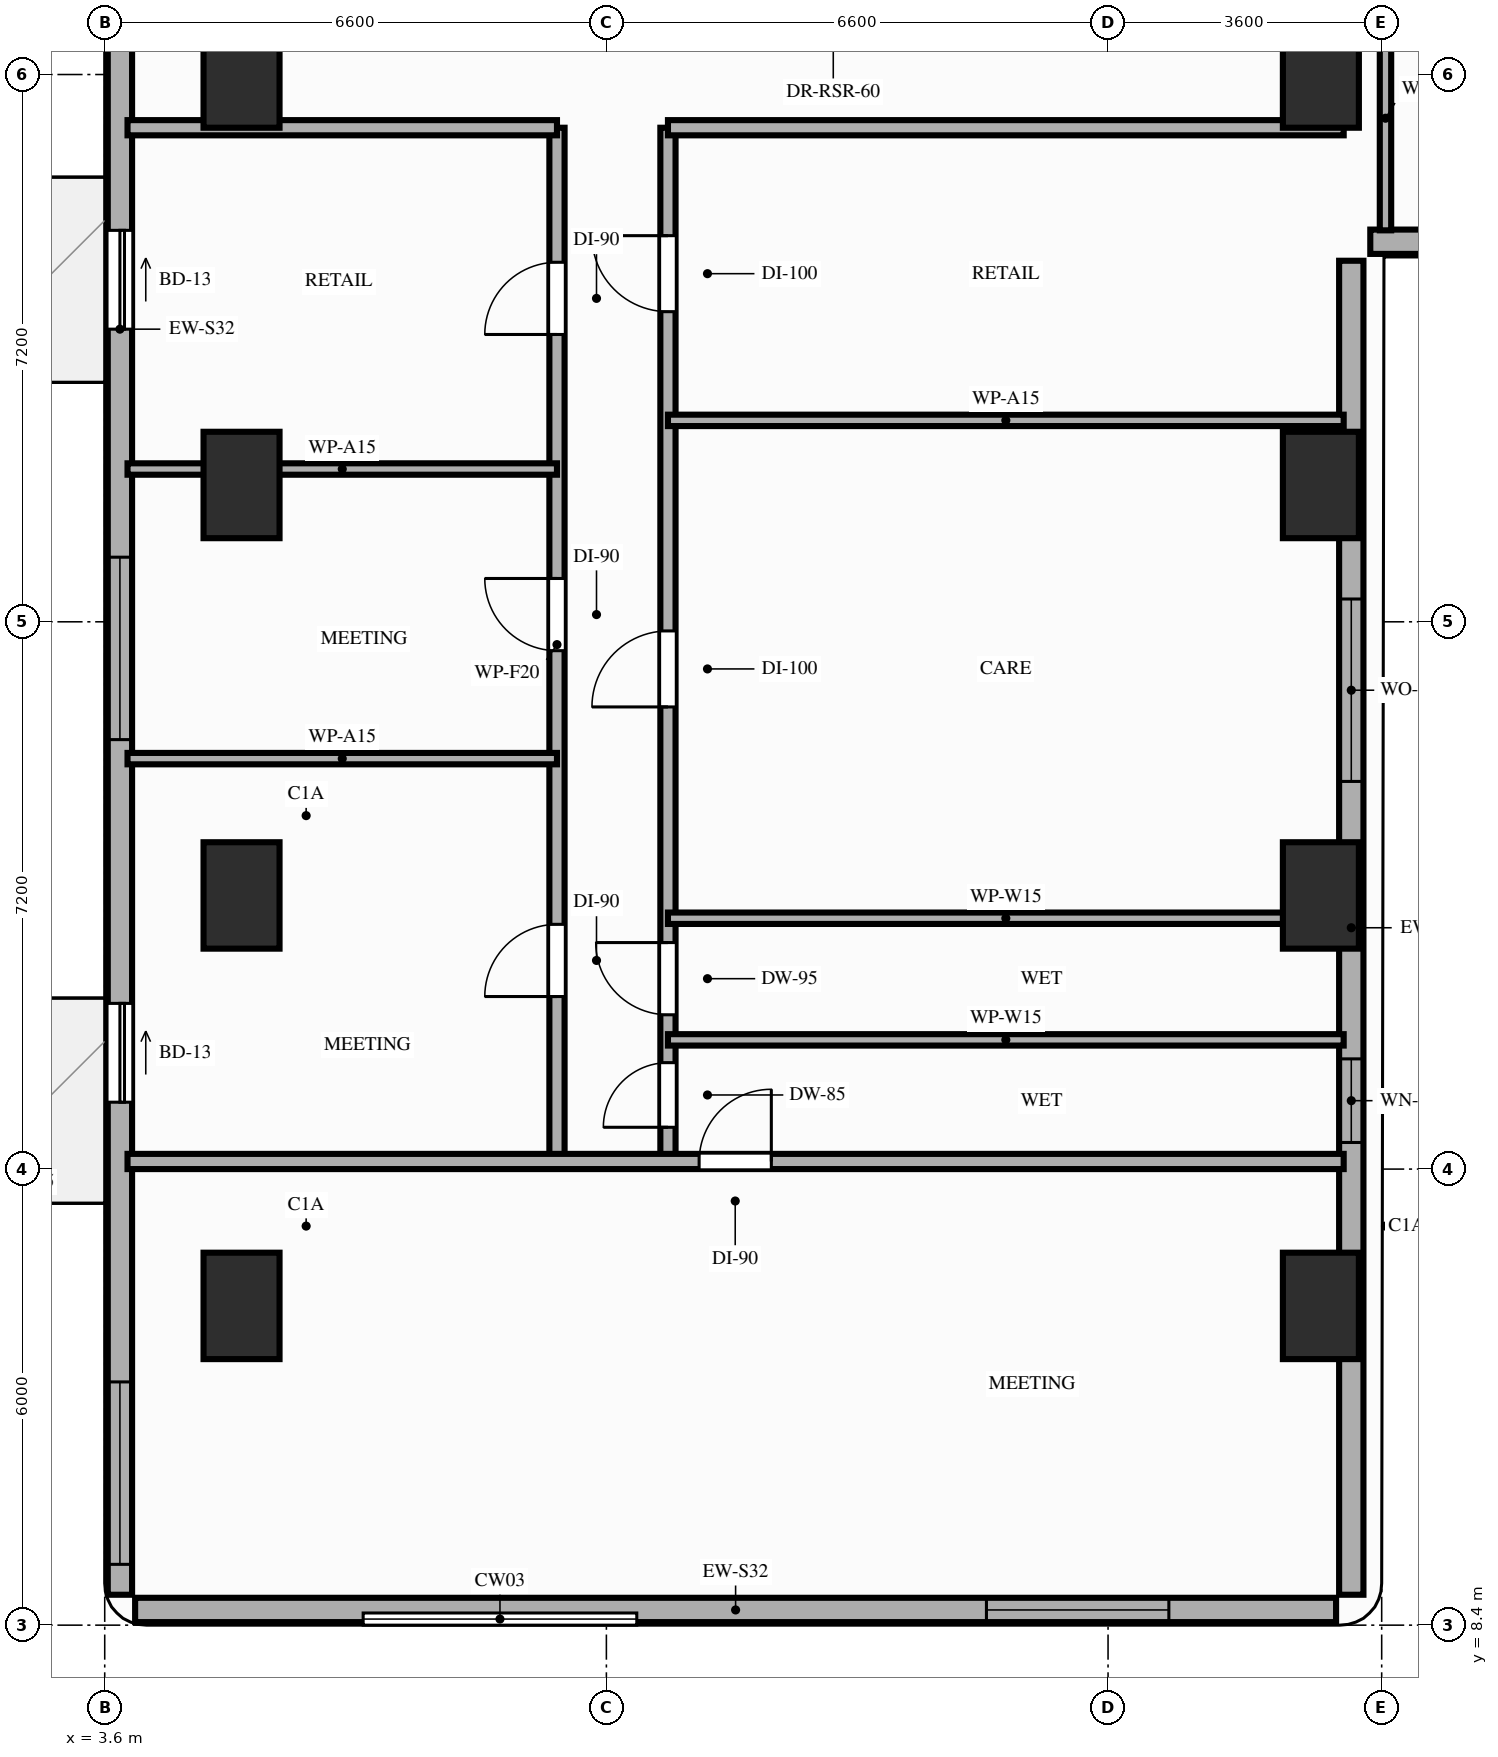
"""IFC4 building model, lengths in metres.
Left out: names, types, materials, properties, quantities, classifications, styles, units other than length and angle.
Written with IfcOpenShell. Run it as: python <this file> out.ifc"""

import sys

from ifc_helpers import new_model, si_unit, direction, frame, frame_2d, origin, origin_2d, place, context, subcontext, project, spatial, rectangle, extrude, element, fill, save


model = new_model("IFC4")
c1 = context("Model", 3, precision=1e-05, world=origin(), true_north=direction((0.0, 1.0)))
c2 = subcontext(c1, "Body", "Model", "MODEL_VIEW")
j1 = project(units=[si_unit("LENGTHUNIT", "METRE"), si_unit("PLANEANGLEUNIT", "RADIAN")], contexts=[c1])
p1 = place(None, origin())
s1 = spatial("IfcSite", under=j1, at=p1, CompositionType="ELEMENT")
p2 = place(p1, origin())
s2 = spatial("IfcBuilding", under=s1, at=p2, CompositionType="ELEMENT")
p3 = place(p2, frame((0.0, 0.0, 50.0)))
s3 = spatial("IfcBuildingStorey", under=s2, at=p3, CompositionType="ELEMENT", Elevation=50.0)
for number, where, z_axis, x_axis in (
    (1, (5.4, 12.6, 0.0), (0.0, 0.0, 1.0), (1.0, 0.0, 0.0)),
    (2, (19.6, 12.6, 0.0), (0.0, 0.0, 1.0), (1.0, 0.0, 0.0)),
    (3, (5.4, 18.0, 0.0), (0.0, 0.0, 1.0), (1.0, 0.0, 0.0)),
    (4, (19.6, 18.0, 0.0), (0.0, 0.0, 1.0), (1.0, 0.0, 0.0)),
    (5, (5.4, 23.4, 0.0), (0.0, 0.0, 1.0), (1.0, 0.0, 0.0)),
    (6, (19.6, 23.4, 0.0), (0.0, 0.0, 1.0), (1.0, 0.0, 0.0)),
    (7, (5.4, 28.8, 0.0), (0.0, 0.0, 1.0), (1.0, 0.0, 0.0)),
    (8, (19.6, 28.8, 0.0), (0.0, 0.0, 1.0), (1.0, 0.0, 0.0)),
):
    element("IfcColumn", number, at=place(p3, frame(where, z_axis=z_axis, x_axis=x_axis)), inside=s3, PredefinedType="COLUMN", context=c2, shape_type="SweptSolid", body=[
        extrude(rectangle(XDim=1.0, YDim=1.4, at=origin_2d()), origin(), (0.0, 0.0, 1.0), 3.2),
    ])
p4 = place(p3, frame((4.0, 8.6, 0.0), z_axis=(0.0, 0.0, 1.0), x_axis=(1.0, 0.0, 0.0)))
e9 = element("IfcWall", 9, at=p4, inside=s3, PredefinedType="STANDARD", context=c2, shape_type="SweptSolid", body=[
    extrude(rectangle(XDim=15.8, YDim=0.32, at=frame_2d((7.9, 0.0))), origin(), (0.0, 0.0, 1.0), 3.02),
])
p5 = place(p4, frame((11.2, 0.0, 0.85)))
e10 = element("IfcOpeningElement", 10, at=p5, cuts=e9, PredefinedType="OPENING", context=c2, shape_type="SweptSolid", body=[
    extrude(rectangle(XDim=2.4, YDim=1.8, at=frame_2d((1.2, 0.9))), frame((0.0, 0.17, 0.0), z_axis=(0.0, -1.0, 0.0), x_axis=(1.0, 0.0, 0.0)), (0.0, 0.0, 1.0), 0.34),
])
p6 = place(p3, frame((3.8, 42.1, 0.0), z_axis=(0.0, 0.0, 1.0), x_axis=(0.0, -1.0, 0.0)))
e11 = element("IfcWall", 11, at=p6, inside=s3, PredefinedType="STANDARD", context=c2, shape_type="SweptSolid", body=[
    extrude(rectangle(XDim=33.3, YDim=0.32, at=frame_2d((16.65, 0.0))), origin(), (0.0, 0.0, 1.0), 2.7),
])
p7 = place(p6, frame((25.52, 0.0, 0.0)))
e12 = element("IfcOpeningElement", 12, at=p7, cuts=e11, PredefinedType="OPENING", context=c2, shape_type="SweptSolid", body=[
    extrude(rectangle(XDim=1.3, YDim=2.08, at=frame_2d((0.65, 1.04))), frame((0.0, 0.17, 0.0), z_axis=(0.0, -1.0, 0.0), x_axis=(1.0, 0.0, 0.0)), (0.0, 0.0, 1.0), 0.34),
])
p8 = place(p6, frame((15.35, 0.0, 0.0)))
e13 = element("IfcOpeningElement", 13, at=p8, cuts=e11, PredefinedType="OPENING", context=c2, shape_type="SweptSolid", body=[
    extrude(rectangle(XDim=1.3, YDim=2.08, at=frame_2d((0.65, 1.04))), frame((0.0, 0.17, 0.0), z_axis=(0.0, -1.0, 0.0), x_axis=(1.0, 0.0, 0.0)), (0.0, 0.0, 1.0), 0.34),
])
p9 = place(p6, frame((30.5, 0.0, 0.85)))
e14 = element("IfcOpeningElement", 14, at=p9, cuts=e11, PredefinedType="OPENING", context=c2, shape_type="SweptSolid", body=[
    extrude(rectangle(XDim=2.4, YDim=1.6, at=frame_2d((1.2, 0.8))), frame((0.0, 0.17, 0.0), z_axis=(0.0, -1.0, 0.0), x_axis=(1.0, 0.0, 0.0)), (0.0, 0.0, 1.0), 0.34),
])
p10 = place(p6, frame((19.65, 0.0, 0.85)))
e15 = element("IfcOpeningElement", 15, at=p10, cuts=e11, PredefinedType="OPENING", context=c2, shape_type="SweptSolid", body=[
    extrude(rectangle(XDim=2.4, YDim=1.6, at=frame_2d((1.2, 0.8))), frame((0.0, 0.17, 0.0), z_axis=(0.0, -1.0, 0.0), x_axis=(1.0, 0.0, 0.0)), (0.0, 0.0, 1.0), 0.34),
])
p11 = place(p6, frame((9.6, 0.0, 0.85)))
e16 = element("IfcOpeningElement", 16, at=p11, cuts=e11, PredefinedType="OPENING", context=c2, shape_type="SweptSolid", body=[
    extrude(rectangle(XDim=2.4, YDim=1.6, at=frame_2d((1.2, 0.8))), frame((0.0, 0.17, 0.0), z_axis=(0.0, -1.0, 0.0), x_axis=(1.0, 0.0, 0.0)), (0.0, 0.0, 1.0), 0.34),
])
p12 = place(p6, frame((3.5, 0.0, 0.85)))
e17 = element("IfcOpeningElement", 17, at=p12, cuts=e11, PredefinedType="OPENING", context=c2, shape_type="SweptSolid", body=[
    extrude(rectangle(XDim=2.4, YDim=1.6, at=frame_2d((1.2, 0.8))), frame((0.0, 0.17, 0.0), z_axis=(0.0, -1.0, 0.0), x_axis=(1.0, 0.0, 0.0)), (0.0, 0.0, 1.0), 0.34),
])
p13 = place(p3, frame((20.0, 8.8, 0.0), z_axis=(0.0, 0.0, 1.0), x_axis=(0.0, 1.0, 0.0)))
e18 = element("IfcWall", 18, at=p13, inside=s3, PredefinedType="STANDARD", context=c2, shape_type="SweptSolid", body=[
    extrude(rectangle(XDim=17.55, YDim=0.32, at=frame_2d((8.775, 0.0))), origin(), (0.0, 0.0, 1.0), 2.41),
])
p14 = place(p13, frame((10.7, 0.0, 0.85)))
e19 = element("IfcOpeningElement", 19, at=p14, cuts=e18, PredefinedType="OPENING", context=c2, shape_type="SweptSolid", body=[
    extrude(rectangle(XDim=2.4, YDim=1.31, at=frame_2d((1.2, 0.655))), frame((0.0, 0.17, 0.0), z_axis=(0.0, -1.0, 0.0), x_axis=(1.0, 0.0, 0.0)), (0.0, 0.0, 1.0), 0.34),
])
p15 = place(p13, frame((5.95, 0.0, 0.85)))
e20 = element("IfcOpeningElement", 20, at=p15, cuts=e18, PredefinedType="OPENING", context=c2, shape_type="SweptSolid", body=[
    extrude(rectangle(XDim=1.1, YDim=1.31, at=frame_2d((0.55, 0.655))), frame((0.0, 0.17, 0.0), z_axis=(0.0, -1.0, 0.0), x_axis=(1.0, 0.0, 0.0)), (0.0, 0.0, 1.0), 0.34),
])
p16 = place(p3, frame((20.25, 26.6, 0.0), z_axis=(0.0, 0.0, 1.0), x_axis=(1.0, 0.0, 0.0)))
e21 = element("IfcWall", 21, at=p16, inside=s3, PredefinedType="STANDARD", context=c2, shape_type="SweptSolid", body=[
    extrude(rectangle(XDim=26.15, YDim=0.32, at=frame_2d((13.075, 0.0))), origin(), (0.0, 0.0, 1.0), 3.02),
])
p17 = place(p16, frame((1.95, 0.0, 0.85)))
e22 = element("IfcOpeningElement", 22, at=p17, cuts=e21, PredefinedType="OPENING", context=c2, shape_type="SweptSolid", body=[
    extrude(rectangle(XDim=2.4, YDim=1.8, at=frame_2d((1.2, 0.9))), frame((0.0, 0.17, 0.0), z_axis=(0.0, -1.0, 0.0), x_axis=(1.0, 0.0, 0.0)), (0.0, 0.0, 1.0), 0.34),
])
p18 = place(p16, frame((7.45, 0.0, 0.85)))
e23 = element("IfcOpeningElement", 23, at=p18, cuts=e21, PredefinedType="OPENING", context=c2, shape_type="SweptSolid", body=[
    extrude(rectangle(XDim=2.4, YDim=1.8, at=frame_2d((1.2, 0.9))), frame((0.0, 0.17, 0.0), z_axis=(0.0, -1.0, 0.0), x_axis=(1.0, 0.0, 0.0)), (0.0, 0.0, 1.0), 0.34),
])
p19 = place(p16, frame((21.95, 0.0, 0.85)))
e24 = element("IfcOpeningElement", 24, at=p19, cuts=e21, PredefinedType="OPENING", context=c2, shape_type="SweptSolid", body=[
    extrude(rectangle(XDim=2.4, YDim=1.8, at=frame_2d((1.2, 0.9))), frame((0.0, 0.17, 0.0), z_axis=(0.0, -1.0, 0.0), x_axis=(1.0, 0.0, 0.0)), (0.0, 0.0, 1.0), 0.34),
])
p20 = place(p3, frame((9.55, 14.5, 0.0), z_axis=(0.0, 0.0, 1.0), x_axis=(0.0, 1.0, 0.0)))
e25 = element("IfcWall", 25, at=p20, inside=s3, PredefinedType="PARTITIONING", context=c2, shape_type="SweptSolid", body=[
    extrude(rectangle(XDim=13.6, YDim=0.2, at=frame_2d((6.8, 0.0))), origin(), (0.0, 0.0, 1.0), 2.41),
])
p21 = place(p20, frame((2.17, 0.0, 0.0)))
e26 = element("IfcOpeningElement", 26, at=p21, cuts=e25, PredefinedType="OPENING", context=c2, shape_type="SweptSolid", body=[
    extrude(rectangle(XDim=0.95, YDim=2.15, at=frame_2d((0.475, 1.075))), frame((0.0, 0.11, 0.0), z_axis=(0.0, -1.0, 0.0), x_axis=(1.0, 0.0, 0.0)), (0.0, 0.0, 1.0), 0.22),
])
p22 = place(p20, frame((6.72, 0.0, 0.0)))
e27 = element("IfcOpeningElement", 27, at=p22, cuts=e25, PredefinedType="OPENING", context=c2, shape_type="SweptSolid", body=[
    extrude(rectangle(XDim=0.95, YDim=2.15, at=frame_2d((0.475, 1.075))), frame((0.0, 0.11, 0.0), z_axis=(0.0, -1.0, 0.0), x_axis=(1.0, 0.0, 0.0)), (0.0, 0.0, 1.0), 0.22),
])
p23 = place(p20, frame((10.88, 0.0, 0.0)))
e28 = element("IfcOpeningElement", 28, at=p23, cuts=e25, PredefinedType="OPENING", context=c2, shape_type="SweptSolid", body=[
    extrude(rectangle(XDim=0.95, YDim=2.15, at=frame_2d((0.475, 1.075))), frame((0.0, 0.11, 0.0), z_axis=(0.0, -1.0, 0.0), x_axis=(1.0, 0.0, 0.0)), (0.0, 0.0, 1.0), 0.22),
])
p24 = place(p3, frame((11.01, 14.5, 0.0), z_axis=(0.0, 0.0, 1.0), x_axis=(0.0, 1.0, 0.0)))
e29 = element("IfcWall", 29, at=p24, inside=s3, PredefinedType="PARTITIONING", context=c2, shape_type="SweptSolid", body=[
    extrude(rectangle(XDim=13.6, YDim=0.2, at=frame_2d((6.8, 0.0))), origin(), (0.0, 0.0, 1.0), 2.41),
])
p25 = place(p24, frame((0.45, 0.0, 0.0)))
e30 = element("IfcOpeningElement", 30, at=p25, cuts=e29, PredefinedType="OPENING", context=c2, shape_type="SweptSolid", body=[
    extrude(rectangle(XDim=0.85, YDim=2.1, at=frame_2d((0.425, 1.05))), frame((0.0, 0.11, 0.0), z_axis=(0.0, -1.0, 0.0), x_axis=(1.0, 0.0, 0.0)), (0.0, 0.0, 1.0), 0.22),
])
p26 = place(p24, frame((1.93, 0.0, 0.0)))
e31 = element("IfcOpeningElement", 31, at=p26, cuts=e29, PredefinedType="OPENING", context=c2, shape_type="SweptSolid", body=[
    extrude(rectangle(XDim=0.95, YDim=2.1, at=frame_2d((0.475, 1.05))), frame((0.0, 0.11, 0.0), z_axis=(0.0, -1.0, 0.0), x_axis=(1.0, 0.0, 0.0)), (0.0, 0.0, 1.0), 0.22),
])
p27 = place(p24, frame((5.98, 0.0, 0.0)))
e32 = element("IfcOpeningElement", 32, at=p27, cuts=e29, PredefinedType="OPENING", context=c2, shape_type="SweptSolid", body=[
    extrude(rectangle(XDim=1.0, YDim=2.15, at=frame_2d((0.5, 1.075))), frame((0.0, 0.11, 0.0), z_axis=(0.0, -1.0, 0.0), x_axis=(1.0, 0.0, 0.0)), (0.0, 0.0, 1.0), 0.22),
])
p28 = place(p24, frame((11.18, 0.0, 0.0)))
e33 = element("IfcOpeningElement", 33, at=p28, cuts=e29, PredefinedType="OPENING", context=c2, shape_type="SweptSolid", body=[
    extrude(rectangle(XDim=1.0, YDim=2.15, at=frame_2d((0.5, 1.075))), frame((0.0, 0.11, 0.0), z_axis=(0.0, -1.0, 0.0), x_axis=(1.0, 0.0, 0.0)), (0.0, 0.0, 1.0), 0.22),
])
p29 = place(p3, frame((3.9, 14.5, 0.0), z_axis=(0.0, 0.0, 1.0), x_axis=(1.0, 0.0, 0.0)))
e34 = element("IfcWall", 34, at=p29, inside=s3, PredefinedType="PARTITIONING", context=c2, shape_type="SweptSolid", body=[
    extrude(rectangle(XDim=16.0, YDim=0.2, at=frame_2d((8.0, 0.0))), origin(), (0.0, 0.0, 1.0), 2.41),
])
p30 = place(p29, frame((7.52, 0.0, 0.0)))
e35 = element("IfcOpeningElement", 35, at=p30, cuts=e34, PredefinedType="OPENING", context=c2, shape_type="SweptSolid", body=[
    extrude(rectangle(XDim=0.95, YDim=2.15, at=frame_2d((0.475, 1.075))), frame((0.0, 0.11, 0.0), z_axis=(0.0, -1.0, 0.0), x_axis=(1.0, 0.0, 0.0)), (0.0, 0.0, 1.0), 0.22),
])
p31 = place(p3, frame((3.9, 28.1, 0.0), z_axis=(0.0, 0.0, 1.0), x_axis=(1.0, 0.0, 0.0)))
e36 = element("IfcWall", 36, at=p31, inside=s3, PredefinedType="PARTITIONING", context=c2, shape_type="SweptSolid", body=[
    extrude(rectangle(XDim=5.65, YDim=0.2, at=frame_2d((2.825, 0.0))), origin(), (0.0, 0.0, 1.0), 2.41),
])
p32 = place(p3, frame((11.01, 28.1, 0.0), z_axis=(0.0, 0.0, 1.0), x_axis=(1.0, 0.0, 0.0)))
e37 = element("IfcWall", 37, at=p32, inside=s3, PredefinedType="PARTITIONING", context=c2, shape_type="SweptSolid", body=[
    extrude(rectangle(XDim=8.89, YDim=0.2, at=frame_2d((4.445, 0.0))), origin(), (0.0, 0.0, 1.0), 2.41),
])
p33 = place(p3, frame((20.45, 26.75, 0.0), z_axis=(0.0, 0.0, 1.0), x_axis=(0.0, 1.0, 0.0)))
e38 = element("IfcWall", 38, at=p33, inside=s3, PredefinedType="PARTITIONING", context=c2, shape_type="SweptSolid", body=[
    extrude(rectangle(XDim=2.95, YDim=0.15, at=frame_2d((1.475, 0.0))), origin(), (0.0, 0.0, 1.0), 2.41),
])
for number, where, z_axis, x_axis in (
    (39, (3.9, 19.8, 0.0), (0.0, 0.0, 1.0), (1.0, 0.0, 0.0)),
    (40, (3.9, 23.61, 0.0), (0.0, 0.0, 1.0), (1.0, 0.0, 0.0)),
):
    element("IfcWall", number, at=place(p3, frame(where, z_axis=z_axis, x_axis=x_axis)), inside=s3, PredefinedType="PARTITIONING", context=c2, shape_type="SweptSolid", body=[
        extrude(rectangle(XDim=5.65, YDim=0.15, at=frame_2d((2.825, 0.0))), origin(), (0.0, 0.0, 1.0), 2.41),
    ])
for number, where, z_axis, x_axis in (
    (41, (11.01, 16.1, 0.0), (0.0, 0.0, 1.0), (1.0, 0.0, 0.0)),
    (42, (11.01, 17.7, 0.0), (0.0, 0.0, 1.0), (1.0, 0.0, 0.0)),
    (43, (11.01, 24.25, 0.0), (0.0, 0.0, 1.0), (1.0, 0.0, 0.0)),
):
    element("IfcWall", number, at=place(p3, frame(where, z_axis=z_axis, x_axis=x_axis)), inside=s3, PredefinedType="PARTITIONING", context=c2, shape_type="SweptSolid", body=[
        extrude(rectangle(XDim=8.89, YDim=0.15, at=frame_2d((4.445, 0.0))), origin(), (0.0, 0.0, 1.0), 2.41),
    ])
p34 = place(p7, origin())
e44 = element("IfcDoor", 44, at=p34, inside=s3, OperationType="SLIDING_TO_LEFT", PredefinedType="DOOR", context=c2, shape_type="SweptSolid", body=[
    extrude(rectangle(XDim=1.3, YDim=2.08, at=frame_2d((0.65, 1.04))), frame((0.0, 0.025, 0.0), z_axis=(0.0, -1.0, 0.0), x_axis=(1.0, 0.0, 0.0)), (0.0, 0.0, 1.0), 0.05),
])
fill(e12, e44)
p35 = place(p8, origin())
e45 = element("IfcDoor", 45, at=p35, inside=s3, OperationType="SLIDING_TO_LEFT", PredefinedType="DOOR", context=c2, shape_type="SweptSolid", body=[
    extrude(rectangle(XDim=1.3, YDim=2.08, at=frame_2d((0.65, 1.04))), frame((0.0, 0.025, 0.0), z_axis=(0.0, -1.0, 0.0), x_axis=(1.0, 0.0, 0.0)), (0.0, 0.0, 1.0), 0.05),
])
fill(e13, e45)
p36 = place(p14, origin())
e46 = element("IfcWindow", 46, at=p36, inside=s3, PartitioningType="SINGLE_PANEL", PredefinedType="WINDOW", context=c2, shape_type="SweptSolid", body=[
    extrude(rectangle(XDim=2.4, YDim=1.31, at=frame_2d((1.2, 0.655))), frame((0.0, 0.03, 0.0), z_axis=(0.0, -1.0, 0.0), x_axis=(1.0, 0.0, 0.0)), (0.0, 0.0, 1.0), 0.06),
])
fill(e19, e46)
p37 = place(p9, origin())
e47 = element("IfcWindow", 47, at=p37, inside=s3, PartitioningType="SINGLE_PANEL", PredefinedType="WINDOW", context=c2, shape_type="SweptSolid", body=[
    extrude(rectangle(XDim=2.4, YDim=1.6, at=frame_2d((1.2, 0.8))), frame((0.0, 0.03, 0.0), z_axis=(0.0, -1.0, 0.0), x_axis=(1.0, 0.0, 0.0)), (0.0, 0.0, 1.0), 0.06),
])
fill(e14, e47)
p38 = place(p10, origin())
e48 = element("IfcWindow", 48, at=p38, inside=s3, PartitioningType="SINGLE_PANEL", PredefinedType="WINDOW", context=c2, shape_type="SweptSolid", body=[
    extrude(rectangle(XDim=2.4, YDim=1.6, at=frame_2d((1.2, 0.8))), frame((0.0, 0.03, 0.0), z_axis=(0.0, -1.0, 0.0), x_axis=(1.0, 0.0, 0.0)), (0.0, 0.0, 1.0), 0.06),
])
fill(e15, e48)
p39 = place(p15, origin())
e49 = element("IfcWindow", 49, at=p39, inside=s3, PartitioningType="SINGLE_PANEL", PredefinedType="WINDOW", context=c2, shape_type="SweptSolid", body=[
    extrude(rectangle(XDim=1.1, YDim=1.31, at=frame_2d((0.55, 0.655))), frame((0.0, 0.03, 0.0), z_axis=(0.0, -1.0, 0.0), x_axis=(1.0, 0.0, 0.0)), (0.0, 0.0, 1.0), 0.06),
])
fill(e20, e49)
p40 = place(p5, origin())
e50 = element("IfcWindow", 50, at=p40, inside=s3, PartitioningType="SINGLE_PANEL", PredefinedType="WINDOW", context=c2, shape_type="SweptSolid", body=[
    extrude(rectangle(XDim=2.4, YDim=1.8, at=frame_2d((1.2, 0.9))), frame((0.0, 0.03, 0.0), z_axis=(0.0, -1.0, 0.0), x_axis=(1.0, 0.0, 0.0)), (0.0, 0.0, 1.0), 0.06),
])
fill(e10, e50)
p41 = place(p21, origin())
e51 = element("IfcDoor", 51, at=p41, inside=s3, OperationType="SINGLE_SWING_LEFT", PredefinedType="DOOR", context=c2, shape_type="SweptSolid", body=[
    extrude(rectangle(XDim=0.95, YDim=2.15, at=frame_2d((0.475, 1.075))), frame((0.0, 0.025, 0.0), z_axis=(0.0, -1.0, 0.0), x_axis=(1.0, 0.0, 0.0)), (0.0, 0.0, 1.0), 0.05),
])
fill(e26, e51)
p42 = place(p22, origin())
e52 = element("IfcDoor", 52, at=p42, inside=s3, OperationType="SINGLE_SWING_RIGHT", PredefinedType="DOOR", context=c2, shape_type="SweptSolid", body=[
    extrude(rectangle(XDim=0.95, YDim=2.15, at=frame_2d((0.475, 1.075))), frame((0.0, 0.025, 0.0), z_axis=(0.0, -1.0, 0.0), x_axis=(1.0, 0.0, 0.0)), (0.0, 0.0, 1.0), 0.05),
])
fill(e27, e52)
p43 = place(p23, origin())
e53 = element("IfcDoor", 53, at=p43, inside=s3, OperationType="SINGLE_SWING_LEFT", PredefinedType="DOOR", context=c2, shape_type="SweptSolid", body=[
    extrude(rectangle(XDim=0.95, YDim=2.15, at=frame_2d((0.475, 1.075))), frame((0.0, 0.025, 0.0), z_axis=(0.0, -1.0, 0.0), x_axis=(1.0, 0.0, 0.0)), (0.0, 0.0, 1.0), 0.05),
])
fill(e28, e53)
p44 = place(p30, origin())
e54 = element("IfcDoor", 54, at=p44, inside=s3, OperationType="SINGLE_SWING_RIGHT", PredefinedType="DOOR", context=c2, shape_type="SweptSolid", body=[
    extrude(rectangle(XDim=0.95, YDim=2.15, at=frame_2d((0.475, 1.075))), frame((0.0, 0.025, 0.0), z_axis=(0.0, -1.0, 0.0), x_axis=(1.0, 0.0, 0.0)), (0.0, 0.0, 1.0), 0.05),
])
fill(e35, e54)
p45 = place(p25, origin())
e55 = element("IfcDoor", 55, at=p45, inside=s3, OperationType="SINGLE_SWING_LEFT", PredefinedType="DOOR", context=c2, shape_type="SweptSolid", body=[
    extrude(rectangle(XDim=0.85, YDim=2.1, at=frame_2d((0.425, 1.05))), frame((0.0, 0.025, 0.0), z_axis=(0.0, -1.0, 0.0), x_axis=(1.0, 0.0, 0.0)), (0.0, 0.0, 1.0), 0.05),
])
fill(e30, e55)
p46 = place(p26, origin())
e56 = element("IfcDoor", 56, at=p46, inside=s3, OperationType="SINGLE_SWING_RIGHT", PredefinedType="DOOR", context=c2, shape_type="SweptSolid", body=[
    extrude(rectangle(XDim=0.95, YDim=2.1, at=frame_2d((0.475, 1.05))), frame((0.0, 0.025, 0.0), z_axis=(0.0, -1.0, 0.0), x_axis=(1.0, 0.0, 0.0)), (0.0, 0.0, 1.0), 0.05),
])
fill(e31, e56)
p47 = place(p27, origin())
e57 = element("IfcDoor", 57, at=p47, inside=s3, OperationType="SINGLE_SWING_LEFT", PredefinedType="DOOR", context=c2, shape_type="SweptSolid", body=[
    extrude(rectangle(XDim=1.0, YDim=2.15, at=frame_2d((0.5, 1.075))), frame((0.0, 0.025, 0.0), z_axis=(0.0, -1.0, 0.0), x_axis=(1.0, 0.0, 0.0)), (0.0, 0.0, 1.0), 0.05),
])
fill(e32, e57)
p48 = place(p28, origin())
e58 = element("IfcDoor", 58, at=p48, inside=s3, OperationType="SINGLE_SWING_RIGHT", PredefinedType="DOOR", context=c2, shape_type="SweptSolid", body=[
    extrude(rectangle(XDim=1.0, YDim=2.15, at=frame_2d((0.5, 1.075))), frame((0.0, 0.025, 0.0), z_axis=(0.0, -1.0, 0.0), x_axis=(1.0, 0.0, 0.0)), (0.0, 0.0, 1.0), 0.05),
])
fill(e33, e58)
save(model, sys.argv[1])
